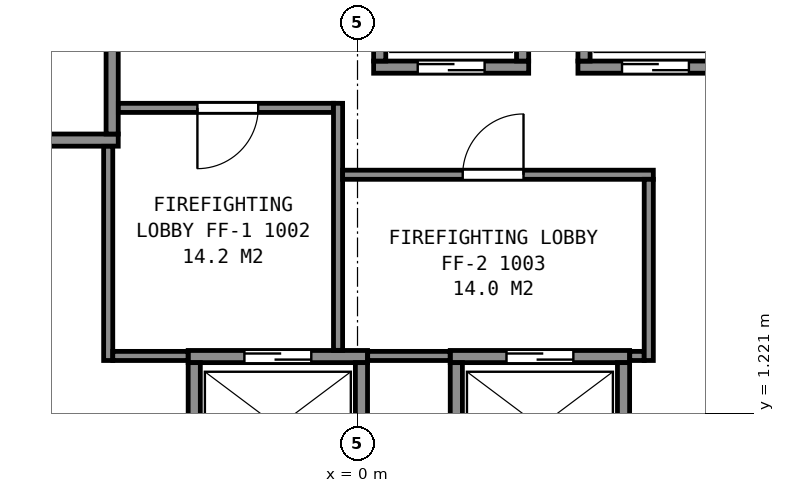
"""IFC4 building model, lengths in metres.
Left out: names, types, materials, properties, quantities, classifications, styles, units other than length and angle.
Written with IfcOpenShell. Run it as: python <this file> out.ifc"""

import sys

from ifc_helpers import new_model, si_unit, direction, frame, frame_2d, origin, place, context, subcontext, project, spatial, rectangle, extrude, element, fill, save


model = new_model("IFC4")
c1 = context("Model", 3, precision=1e-05, world=origin(), true_north=direction((0.0, 1.0)))
c2 = subcontext(c1, "Body", "Model", "MODEL_VIEW")
j1 = project(units=[si_unit("LENGTHUNIT", "METRE"), si_unit("PLANEANGLEUNIT", "RADIAN")], contexts=[c1])
p1 = place(None, origin())
s1 = spatial("IfcSite", under=j1, at=p1, CompositionType="ELEMENT")
p2 = place(p1, origin())
s2 = spatial("IfcBuilding", under=s1, at=p2, CompositionType="ELEMENT")
p3 = place(p2, frame((0.0, 0.0, 51.2)))
s3 = spatial("IfcBuildingStorey", under=s2, at=p3, CompositionType="ELEMENT", Elevation=51.2)
p4 = place(p3, frame((-2.785, 2.15, 0.0), z_axis=(0.0, 0.0, 1.0), x_axis=(1.0, 0.0, 0.0)))
e1 = element("IfcWall", 1, at=p4, inside=s3, PredefinedType="PARTITIONING", context=c2, shape_type="SweptSolid", body=[
    extrude(rectangle(XDim=2.95, YDim=0.2, at=frame_2d((1.475, 0.0))), origin(), (0.0, 0.0, 1.0), 3.6),
])
p5 = place(p4, frame((0.925, 0.0, 0.0)))
e2 = element("IfcOpeningElement", 2, at=p5, cuts=e1, PredefinedType="OPENING", context=c2, shape_type="SweptSolid", body=[
    extrude(rectangle(XDim=1.1, YDim=2.1, at=frame_2d((0.55, 1.05))), frame((0.0, 0.11, 0.0), z_axis=(0.0, -1.0, 0.0), x_axis=(1.0, 0.0, 0.0)), (0.0, 0.0, 1.0), 0.22),
])
p6 = place(p3, frame((1.525, 2.15, 0.0), z_axis=(0.0, 0.0, 1.0), x_axis=(1.0, 0.0, 0.0)))
e3 = element("IfcWall", 3, at=p6, inside=s3, PredefinedType="PARTITIONING", context=c2, shape_type="SweptSolid", body=[
    extrude(rectangle(XDim=2.95, YDim=0.2, at=frame_2d((1.475, 0.0))), origin(), (0.0, 0.0, 1.0), 3.6),
])
p7 = place(p6, frame((0.925, 0.0, 0.0)))
e4 = element("IfcOpeningElement", 4, at=p7, cuts=e3, PredefinedType="OPENING", context=c2, shape_type="SweptSolid", body=[
    extrude(rectangle(XDim=1.1, YDim=2.1, at=frame_2d((0.55, 1.05))), frame((0.0, 0.11, 0.0), z_axis=(0.0, -1.0, 0.0), x_axis=(1.0, 0.0, 0.0)), (0.0, 0.0, 1.0), 0.22),
])
p8 = place(p3, frame((-6.285, 5.71, 0.0), z_axis=(0.0, 0.0, 1.0), x_axis=(1.0, 0.0, 0.0)))
e5 = element("IfcWall", 5, at=p8, inside=s3, PredefinedType="PARTITIONING", context=c2, shape_type="SweptSolid", body=[
    extrude(rectangle(XDim=2.35, YDim=0.2, at=frame_2d((1.175, 0.0))), origin(), (0.0, 0.0, 1.0), 3.6),
])
p9 = place(p3, frame((0.265, 6.91, 0.0), z_axis=(0.0, 0.0, 1.0), x_axis=(1.0, 0.0, 0.0)))
e6 = element("IfcWall", 6, at=p9, inside=s3, PredefinedType="PARTITIONING", context=c2, shape_type="SweptSolid", body=[
    extrude(rectangle(XDim=2.55, YDim=0.2, at=frame_2d((1.275, 0.0))), origin(), (0.0, 0.0, 1.0), 3.6),
])
p10 = place(p9, frame((0.725, 0.0, 0.0)))
e7 = element("IfcOpeningElement", 7, at=p10, cuts=e6, PredefinedType="OPENING", context=c2, shape_type="SweptSolid", body=[
    extrude(rectangle(XDim=1.1, YDim=2.1, at=frame_2d((0.55, 1.05))), frame((0.0, 0.11, 0.0), z_axis=(0.0, -1.0, 0.0), x_axis=(1.0, 0.0, 0.0)), (0.0, 0.0, 1.0), 0.22),
])
p11 = place(p3, frame((3.625, 6.91, 0.0), z_axis=(0.0, 0.0, 1.0), x_axis=(1.0, 0.0, 0.0)))
e8 = element("IfcWall", 8, at=p11, inside=s3, PredefinedType="PARTITIONING", context=c2, shape_type="SweptSolid", body=[
    extrude(rectangle(XDim=2.55, YDim=0.2, at=frame_2d((1.275, 0.0))), origin(), (0.0, 0.0, 1.0), 3.6),
])
p12 = place(p11, frame((0.725, 0.0, 0.0)))
e9 = element("IfcOpeningElement", 9, at=p12, cuts=e8, PredefinedType="OPENING", context=c2, shape_type="SweptSolid", body=[
    extrude(rectangle(XDim=1.1, YDim=2.1, at=frame_2d((0.55, 1.05))), frame((0.0, 0.11, 0.0), z_axis=(0.0, -1.0, 0.0), x_axis=(1.0, 0.0, 0.0)), (0.0, 0.0, 1.0), 0.22),
])
p13 = place(p3, frame((5.663, -1.612, 0.0), z_axis=(0.0, 0.0, 1.0), x_axis=(0.49998122708, 0.866036242063, 0.0)))
e10 = element("IfcWall", 10, at=p13, inside=s3, PredefinedType="PARTITIONING", context=c2, shape_type="SweptSolid", body=[
    extrude(rectangle(XDim=4.9, YDim=0.2, at=frame_2d((2.45, 0.0))), origin(), (0.0, 0.0, 1.0), 3.6),
])
p14 = place(p3, frame((4.375, 0.1, 0.0), z_axis=(0.0, 0.0, 1.0), x_axis=(0.0, 1.0, 0.0)))
e11 = element("IfcWall", 11, at=p14, inside=s3, PredefinedType="PARTITIONING", context=c2, shape_type="SweptSolid", body=[
    extrude(rectangle(XDim=1.95, YDim=0.2, at=frame_2d((0.975, 0.0))), origin(), (0.0, 0.0, 1.0), 3.6),
])
for number, where, z_axis, x_axis in (
    (12, (3.725, 7.01, 0.0), (0.0, 0.0, 1.0), (0.0, 1.0, 0.0)),
    (13, (2.715, 7.01, 0.0), (0.0, 0.0, 1.0), (0.0, 1.0, 0.0)),
):
    element("IfcWall", number, at=place(p3, frame(where, z_axis=z_axis, x_axis=x_axis)), inside=s3, PredefinedType="PARTITIONING", context=c2, shape_type="SweptSolid", body=[
        extrude(rectangle(XDim=1.75, YDim=0.2, at=frame_2d((0.875, 0.0))), origin(), (0.0, 0.0, 1.0), 3.6),
    ])
p15 = place(p3, frame((1.625, 0.1, 0.0), z_axis=(0.0, 0.0, 1.0), x_axis=(0.0, 1.0, 0.0)))
e14 = element("IfcWall", 14, at=p15, inside=s3, PredefinedType="PARTITIONING", context=c2, shape_type="SweptSolid", body=[
    extrude(rectangle(XDim=1.95, YDim=0.2, at=frame_2d((0.975, 0.0))), origin(), (0.0, 0.0, 1.0), 3.6),
])
p16 = place(p3, frame((0.365, 7.01, 0.0), z_axis=(0.0, 0.0, 1.0), x_axis=(0.0, 1.0, 0.0)))
e15 = element("IfcWall", 15, at=p16, inside=s3, PredefinedType="PARTITIONING", context=c2, shape_type="SweptSolid", body=[
    extrude(rectangle(XDim=1.75, YDim=0.2, at=frame_2d((0.875, 0.0))), origin(), (0.0, 0.0, 1.0), 3.6),
])
for number, where, z_axis, x_axis in (
    (16, (0.065, 0.1, 0.0), (0.0, 0.0, 1.0), (0.0, 1.0, 0.0)),
    (17, (-2.685, 0.1, 0.0), (0.0, 0.0, 1.0), (0.0, 1.0, 0.0)),
):
    element("IfcWall", number, at=place(p3, frame(where, z_axis=z_axis, x_axis=x_axis)), inside=s3, PredefinedType="PARTITIONING", context=c2, shape_type="SweptSolid", body=[
        extrude(rectangle(XDim=1.95, YDim=0.2, at=frame_2d((0.975, 0.0))), origin(), (0.0, 0.0, 1.0), 3.6),
    ])
p17 = place(p3, frame((-4.035, 5.81, 0.0), z_axis=(0.0, 0.0, 1.0), x_axis=(0.0, 1.0, 0.0)))
e18 = element("IfcWall", 18, at=p17, inside=s3, PredefinedType="PARTITIONING", context=c2, shape_type="SweptSolid", body=[
    extrude(rectangle(XDim=1.75, YDim=0.2, at=frame_2d((0.875, 0.0))), origin(), (0.0, 0.0, 1.0), 3.6),
])
p18 = place(p3, frame((-13.664, 5.946, 0.0), z_axis=(0.0, 0.0, 1.0), x_axis=(0.499994327219, -0.866028678941, 0.0)))
e19 = element("IfcWall", 19, at=p18, inside=s3, PredefinedType="PARTITIONING", context=c2, shape_type="SweptSolid", body=[
    extrude(rectangle(XDim=23.968, YDim=0.2, at=frame_2d((11.984, 0.0))), origin(), (0.0, 0.0, 1.0), 3.35),
])
p19 = place(p3, frame((-4.1, 2.085, 0.0), z_axis=(0.0, 0.0, 1.0), x_axis=(0.0, 1.0, 0.0)))
e20 = element("IfcWall", 20, at=p19, inside=s3, PredefinedType="PARTITIONING", context=c2, shape_type="SweptSolid", body=[
    extrude(rectangle(XDim=3.523, YDim=0.15, at=frame_2d((1.761, 0.0))), origin(), (0.0, 0.0, 1.0), 3.35),
])
p20 = place(p3, frame((-4.025, 2.16, 0.0), z_axis=(0.0, 0.0, 1.0), x_axis=(1.0, 0.0, 0.0)))
e21 = element("IfcWall", 21, at=p20, inside=s3, PredefinedType="PARTITIONING", context=c2, shape_type="SweptSolid", body=[
    extrude(rectangle(XDim=1.238, YDim=0.15, at=frame_2d((0.619, 0.0))), origin(), (0.0, 0.0, 1.0), 3.35),
])
p21 = place(p3, frame((-3.933, 6.24, 0.0), z_axis=(0.0, 0.0, 1.0), x_axis=(1.0, 0.0, 0.0)))
e22 = element("IfcWall", 22, at=p21, inside=s3, PredefinedType="PARTITIONING", context=c2, shape_type="SweptSolid", body=[
    extrude(rectangle(XDim=3.538, YDim=0.15, at=frame_2d((1.769, 0.0))), origin(), (0.0, 0.0, 1.0), 3.35),
])
p22 = place(p21, frame((1.3, 0.0, 0.0)))
e23 = element("IfcOpeningElement", 23, at=p22, cuts=e22, PredefinedType="OPENING", context=c2, shape_type="SweptSolid", body=[
    extrude(rectangle(XDim=1.0, YDim=2.1, at=frame_2d((0.5, 1.05))), frame((0.0, 0.085, 0.0), z_axis=(0.0, -1.0, 0.0), x_axis=(1.0, 0.0, 0.0)), (0.0, 0.0, 1.0), 0.17),
])
p23 = place(p3, frame((-0.32, 2.252, 0.0), z_axis=(0.0, 0.0, 1.0), x_axis=(0.0, 1.0, 0.0)))
e24 = element("IfcWall", 24, at=p23, inside=s3, PredefinedType="PARTITIONING", context=c2, shape_type="SweptSolid", body=[
    extrude(rectangle(XDim=4.063, YDim=0.15, at=frame_2d((2.031, 0.0))), origin(), (0.0, 0.0, 1.0), 3.35),
])
p24 = place(p3, frame((-0.245, 5.14, 0.0), z_axis=(0.0, 0.0, 1.0), x_axis=(1.0, 0.0, 0.0)))
e25 = element("IfcWall", 25, at=p24, inside=s3, PredefinedType="PARTITIONING", context=c2, shape_type="SweptSolid", body=[
    extrude(rectangle(XDim=5.11, YDim=0.15, at=frame_2d((2.555, 0.0))), origin(), (0.0, 0.0, 1.0), 3.35),
])
p25 = place(p24, frame((1.975, 0.0, 0.0)))
e26 = element("IfcOpeningElement", 26, at=p25, cuts=e25, PredefinedType="OPENING", context=c2, shape_type="SweptSolid", body=[
    extrude(rectangle(XDim=1.0, YDim=2.1, at=frame_2d((0.5, 1.05))), frame((0.0, 0.085, 0.0), z_axis=(0.0, -1.0, 0.0), x_axis=(1.0, 0.0, 0.0)), (0.0, 0.0, 1.0), 0.17),
])
p26 = place(p3, frame((0.167, 2.16, 0.0), z_axis=(0.0, 0.0, 1.0), x_axis=(1.0, 0.0, 0.0)))
e27 = element("IfcWall", 27, at=p26, inside=s3, PredefinedType="PARTITIONING", context=c2, shape_type="SweptSolid", body=[
    extrude(rectangle(XDim=1.356, YDim=0.15, at=frame_2d((0.678, 0.0))), origin(), (0.0, 0.0, 1.0), 3.35),
])
p27 = place(p3, frame((4.477, 2.16, 0.0), z_axis=(0.0, 0.0, 1.0), x_axis=(1.0, 0.0, 0.0)))
e28 = element("IfcWall", 28, at=p27, inside=s3, PredefinedType="PARTITIONING", context=c2, shape_type="SweptSolid", body=[
    extrude(rectangle(XDim=0.238, YDim=0.15, at=frame_2d((0.119, 0.0))), origin(), (0.0, 0.0, 1.0), 3.35),
])
p28 = place(p3, frame((4.79, 2.085, 0.0), z_axis=(0.0, 0.0, 1.0), x_axis=(0.0, 1.0, 0.0)))
e29 = element("IfcWall", 29, at=p28, inside=s3, PredefinedType="PARTITIONING", context=c2, shape_type="SweptSolid", body=[
    extrude(rectangle(XDim=2.98, YDim=0.15, at=frame_2d((1.49, 0.0))), origin(), (0.0, 0.0, 1.0), 3.35),
])
p29 = place(p3, frame((-3.766, -17.959, 0.0), z_axis=(0.0, 0.0, 1.0), x_axis=(-0.500002884005, 0.866023738697, 0.0)))
e30 = element("IfcWall", 30, at=p29, inside=s3, PredefinedType="PARTITIONING", context=c2, shape_type="SweptSolid", body=[
    extrude(rectangle(XDim=28.135, YDim=0.125, at=frame_2d((14.067, 0.0))), origin(), (0.0, 0.0, 1.0), 2.613),
])
p30 = place(p29, frame((25.422, 0.0, 0.0)))
e31 = element("IfcOpeningElement", 31, at=p30, cuts=e30, PredefinedType="OPENING", context=c2, shape_type="SweptSolid", body=[
    extrude(rectangle(XDim=1.0, YDim=2.1, at=frame_2d((0.5, 1.05))), frame((0.0, 0.073, 0.0), z_axis=(0.0, -1.0, 0.0), x_axis=(1.0, 0.0, 0.0)), (0.0, 0.0, 1.0), 0.145),
])
p31 = place(p29, frame((21.693, 0.0, 0.0)))
e32 = element("IfcOpeningElement", 32, at=p31, cuts=e30, PredefinedType="OPENING", context=c2, shape_type="SweptSolid", body=[
    extrude(rectangle(XDim=0.9, YDim=2.1, at=frame_2d((0.45, 1.05))), frame((0.0, 0.073, 0.0), z_axis=(0.0, -1.0, 0.0), x_axis=(1.0, 0.0, 0.0)), (0.0, 0.0, 1.0), 0.145),
])
p32 = place(p29, frame((14.438, 0.0, 0.0)))
e33 = element("IfcOpeningElement", 33, at=p32, cuts=e30, PredefinedType="OPENING", context=c2, shape_type="SweptSolid", body=[
    extrude(rectangle(XDim=0.9, YDim=2.1, at=frame_2d((0.45, 1.05))), frame((0.0, 0.073, 0.0), z_axis=(0.0, -1.0, 0.0), x_axis=(1.0, 0.0, 0.0)), (0.0, 0.0, 1.0), 0.145),
])
p33 = place(p29, frame((11.712, 0.0, 0.0)))
e34 = element("IfcOpeningElement", 34, at=p33, cuts=e30, PredefinedType="OPENING", context=c2, shape_type="SweptSolid", body=[
    extrude(rectangle(XDim=0.9, YDim=2.1, at=frame_2d((0.45, 1.05))), frame((0.0, 0.073, 0.0), z_axis=(0.0, -1.0, 0.0), x_axis=(1.0, 0.0, 0.0)), (0.0, 0.0, 1.0), 0.145),
])
p34 = place(p29, frame((4.787, 0.0, 0.0)))
e35 = element("IfcOpeningElement", 35, at=p34, cuts=e30, PredefinedType="OPENING", context=c2, shape_type="SweptSolid", body=[
    extrude(rectangle(XDim=0.9, YDim=2.1, at=frame_2d((0.45, 1.05))), frame((0.0, 0.073, 0.0), z_axis=(0.0, -1.0, 0.0), x_axis=(1.0, 0.0, 0.0)), (0.0, 0.0, 1.0), 0.145),
])
p35 = place(p29, frame((1.762, 0.0, 0.0)))
e36 = element("IfcOpeningElement", 36, at=p35, cuts=e30, PredefinedType="OPENING", context=c2, shape_type="SweptSolid", body=[
    extrude(rectangle(XDim=0.9, YDim=2.1, at=frame_2d((0.45, 1.05))), frame((0.0, 0.073, 0.0), z_axis=(0.0, -1.0, 0.0), x_axis=(1.0, 0.0, 0.0)), (0.0, 0.0, 1.0), 0.145),
])
p36 = place(p3, frame((17.833, 6.406, 0.0), z_axis=(0.0, 0.0, 1.0), x_axis=(-0.500002884005, -0.866023738697, 0.0)))
e37 = element("IfcWall", 37, at=p36, inside=s3, PredefinedType="PARTITIONING", context=c2, shape_type="SweptSolid", body=[
    extrude(rectangle(XDim=28.135, YDim=0.125, at=frame_2d((14.067, 0.0))), origin(), (0.0, 0.0, 1.0), 2.613),
])
p37 = place(p36, frame((26.522, 0.0, 0.0)))
e38 = element("IfcOpeningElement", 38, at=p37, cuts=e37, PredefinedType="OPENING", context=c2, shape_type="SweptSolid", body=[
    extrude(rectangle(XDim=0.9, YDim=2.1, at=frame_2d((0.45, 1.05))), frame((0.0, 0.073, 0.0), z_axis=(0.0, -1.0, 0.0), x_axis=(1.0, 0.0, 0.0)), (0.0, 0.0, 1.0), 0.145),
])
p38 = place(p36, frame((23.184, 0.0, 0.0)))
e39 = element("IfcOpeningElement", 39, at=p38, cuts=e37, PredefinedType="OPENING", context=c2, shape_type="SweptSolid", body=[
    extrude(rectangle(XDim=0.9, YDim=2.1, at=frame_2d((0.45, 1.05))), frame((0.0, 0.073, 0.0), z_axis=(0.0, -1.0, 0.0), x_axis=(1.0, 0.0, 0.0)), (0.0, 0.0, 1.0), 0.145),
])
p39 = place(p36, frame((18.683, 0.0, 0.0)))
e40 = element("IfcOpeningElement", 40, at=p39, cuts=e37, PredefinedType="OPENING", context=c2, shape_type="SweptSolid", body=[
    extrude(rectangle(XDim=0.9, YDim=2.1, at=frame_2d((0.45, 1.05))), frame((0.0, 0.073, 0.0), z_axis=(0.0, -1.0, 0.0), x_axis=(1.0, 0.0, 0.0)), (0.0, 0.0, 1.0), 0.145),
])
p40 = place(p36, frame((14.182, 0.0, 0.0)))
e41 = element("IfcOpeningElement", 41, at=p40, cuts=e37, PredefinedType="OPENING", context=c2, shape_type="SweptSolid", body=[
    extrude(rectangle(XDim=0.9, YDim=2.1, at=frame_2d((0.45, 1.05))), frame((0.0, 0.073, 0.0), z_axis=(0.0, -1.0, 0.0), x_axis=(1.0, 0.0, 0.0)), (0.0, 0.0, 1.0), 0.145),
])
p41 = place(p36, frame((9.681, 0.0, 0.0)))
e42 = element("IfcOpeningElement", 42, at=p41, cuts=e37, PredefinedType="OPENING", context=c2, shape_type="SweptSolid", body=[
    extrude(rectangle(XDim=0.9, YDim=2.1, at=frame_2d((0.45, 1.05))), frame((0.0, 0.073, 0.0), z_axis=(0.0, -1.0, 0.0), x_axis=(1.0, 0.0, 0.0)), (0.0, 0.0, 1.0), 0.145),
])
p42 = place(p36, frame((5.18, 0.0, 0.0)))
e43 = element("IfcOpeningElement", 43, at=p42, cuts=e37, PredefinedType="OPENING", context=c2, shape_type="SweptSolid", body=[
    extrude(rectangle(XDim=0.9, YDim=2.1, at=frame_2d((0.45, 1.05))), frame((0.0, 0.073, 0.0), z_axis=(0.0, -1.0, 0.0), x_axis=(1.0, 0.0, 0.0)), (0.0, 0.0, 1.0), 0.145),
])
p43 = place(p36, frame((1.278, 0.0, 0.0)))
e44 = element("IfcOpeningElement", 44, at=p43, cuts=e37, PredefinedType="OPENING", context=c2, shape_type="SweptSolid", body=[
    extrude(rectangle(XDim=0.9, YDim=2.1, at=frame_2d((0.45, 1.05))), frame((0.0, 0.073, 0.0), z_axis=(0.0, -1.0, 0.0), x_axis=(1.0, 0.0, 0.0)), (0.0, 0.0, 1.0), 0.145),
])
p44 = place(p10, origin())
e45 = element("IfcDoor", 45, at=p44, inside=s3, OperationType="SLIDING_TO_LEFT", PredefinedType="DOOR", context=c2, shape_type="SweptSolid", body=[
    extrude(rectangle(XDim=1.1, YDim=2.1, at=frame_2d((0.55, 1.05))), frame((0.0, 0.025, 0.0), z_axis=(0.0, -1.0, 0.0), x_axis=(1.0, 0.0, 0.0)), (0.0, 0.0, 1.0), 0.05),
])
fill(e7, e45)
p45 = place(p12, origin())
e46 = element("IfcDoor", 46, at=p45, inside=s3, OperationType="SLIDING_TO_LEFT", PredefinedType="DOOR", context=c2, shape_type="SweptSolid", body=[
    extrude(rectangle(XDim=1.1, YDim=2.1, at=frame_2d((0.55, 1.05))), frame((0.0, 0.025, 0.0), z_axis=(0.0, -1.0, 0.0), x_axis=(1.0, 0.0, 0.0)), (0.0, 0.0, 1.0), 0.05),
])
fill(e9, e46)
p46 = place(p5, origin())
e47 = element("IfcDoor", 47, at=p46, inside=s3, OperationType="SLIDING_TO_LEFT", PredefinedType="DOOR", context=c2, shape_type="SweptSolid", body=[
    extrude(rectangle(XDim=1.1, YDim=2.1, at=frame_2d((0.55, 1.05))), frame((0.0, 0.025, 0.0), z_axis=(0.0, -1.0, 0.0), x_axis=(1.0, 0.0, 0.0)), (0.0, 0.0, 1.0), 0.05),
])
fill(e2, e47)
p47 = place(p7, origin())
e48 = element("IfcDoor", 48, at=p47, inside=s3, OperationType="SLIDING_TO_RIGHT", PredefinedType="DOOR", context=c2, shape_type="SweptSolid", body=[
    extrude(rectangle(XDim=1.1, YDim=2.1, at=frame_2d((0.55, 1.05))), frame((0.0, 0.025, 0.0), z_axis=(0.0, -1.0, 0.0), x_axis=(1.0, 0.0, 0.0)), (0.0, 0.0, 1.0), 0.05),
])
fill(e4, e48)
p48 = place(p22, origin())
e49 = element("IfcDoor", 49, at=p48, inside=s3, OperationType="SINGLE_SWING_LEFT", PredefinedType="DOOR", context=c2, shape_type="SweptSolid", body=[
    extrude(rectangle(XDim=1.0, YDim=2.1, at=frame_2d((0.5, 1.05))), frame((0.0, 0.025, 0.0), z_axis=(0.0, -1.0, 0.0), x_axis=(1.0, 0.0, 0.0)), (0.0, 0.0, 1.0), 0.05),
])
fill(e23, e49)
p49 = place(p25, origin())
e50 = element("IfcDoor", 50, at=p49, inside=s3, OperationType="SINGLE_SWING_RIGHT", PredefinedType="DOOR", context=c2, shape_type="SweptSolid", body=[
    extrude(rectangle(XDim=1.0, YDim=2.1, at=frame_2d((0.5, 1.05))), frame((0.0, 0.025, 0.0), z_axis=(0.0, -1.0, 0.0), x_axis=(1.0, 0.0, 0.0)), (0.0, 0.0, 1.0), 0.05),
])
fill(e26, e50)
save(model, sys.argv[1])
